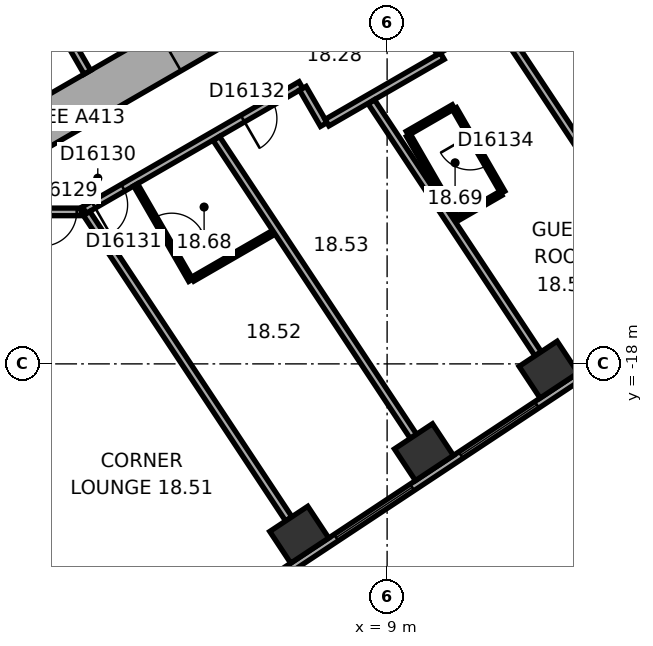
"""IFC4 building model, lengths in metres.
Left out: names, types, materials, properties, quantities, classifications, styles, units other than length and angle.
Written with IfcOpenShell. Run it as: python <this file> out.ifc"""

import sys

from ifc_helpers import new_model, si_unit, direction, frame, frame_2d, origin, origin_2d, place, context, subcontext, project, spatial, rectangle, extrude, element, fill, save


model = new_model("IFC4")
c1 = context("Model", 3, precision=1e-05, world=origin(), true_north=direction((0.0, 1.0)))
c2 = subcontext(c1, "Body", "Model", "MODEL_VIEW")
j1 = project(units=[si_unit("LENGTHUNIT", "METRE"), si_unit("PLANEANGLEUNIT", "RADIAN")], contexts=[c1])
p1 = place(None, origin())
s1 = spatial("IfcSite", under=j1, at=p1, CompositionType="ELEMENT")
p2 = place(p1, origin())
s2 = spatial("IfcBuilding", under=s1, at=p2, CompositionType="ELEMENT")
p3 = place(p2, frame((0.0, 0.0, 83.6)))
s3 = spatial("IfcBuildingStorey", under=s2, at=p3, CompositionType="ELEMENT", Elevation=83.6)
for number, where, z_axis, x_axis in (
    (1, (6.688, -22.496, 0.0), (0.0, 0.0, 1.0), (0.834, 0.552, 0.0)),
    (2, (9.969, -20.324, 0.0), (0.0, 0.0, 1.0), (0.834, 0.552, 0.0)),
    (3, (13.25, -18.152, 0.0), (0.0, 0.0, 1.0), (0.834, 0.552, 0.0)),
):
    element("IfcColumn", number, at=place(p3, frame(where, z_axis=z_axis, x_axis=x_axis)), inside=s3, PredefinedType="COLUMN", context=c2, shape_type="SweptSolid", body=[
        extrude(rectangle(XDim=1.2, YDim=1.0, at=origin_2d()), origin(), (0.0, 0.0, 1.0), 3.3),
    ])
p4 = place(p3, frame((-10.4, -5.658, 0.0), z_axis=(0.0, 0.0, 1.0), x_axis=(0.866021384402, -0.500006961711, 0.0)))
e4 = element("IfcWall", 4, at=p4, inside=s3, PredefinedType="SHEAR", context=c2, shape_type="SweptSolid", body=[
    extrude(rectangle(XDim=12.355, YDim=1.2, at=frame_2d((6.178, 0.0))), origin(), (0.0, 0.0, 1.0), 3.3),
])
p5 = place(p4, frame((6.378, 0.0, 0.0)))
e5 = element("IfcOpeningElement", 5, at=p5, cuts=e4, PredefinedType="OPENING", context=c2, shape_type="SweptSolid", body=[
    extrude(rectangle(XDim=1.5, YDim=2.1, at=frame_2d((0.75, 1.05))), frame((0.0, 0.61, 0.0), z_axis=(0.0, -1.0, 0.0), x_axis=(1.0, 0.0, 0.0)), (0.0, 0.0, 1.0), 1.22),
])
p6 = place(p4, frame((3.228, 0.0, 0.0)))
e6 = element("IfcOpeningElement", 6, at=p6, cuts=e4, PredefinedType="OPENING", context=c2, shape_type="SweptSolid", body=[
    extrude(rectangle(XDim=0.9, YDim=2.1, at=frame_2d((0.45, 1.05))), frame((0.0, 0.61, 0.0), z_axis=(0.0, -1.0, 0.0), x_axis=(1.0, 0.0, 0.0)), (0.0, 0.0, 1.0), 1.22),
])
p7 = place(p3, frame((-0.3, -11.836, 0.0), z_axis=(0.0, 0.0, 1.0), x_axis=(0.866021384402, 0.500006961711, 0.0)))
e7 = element("IfcWall", 7, at=p7, inside=s3, PredefinedType="SHEAR", context=c2, shape_type="SweptSolid", body=[
    extrude(rectangle(XDim=12.355, YDim=1.2, at=frame_2d((6.178, 0.0))), origin(), (0.0, 0.0, 1.0), 3.3),
])
p8 = place(p7, frame((4.128, 0.0, 0.0)))
e8 = element("IfcOpeningElement", 8, at=p8, cuts=e7, PredefinedType="OPENING", context=c2, shape_type="SweptSolid", body=[
    extrude(rectangle(XDim=0.9, YDim=2.1, at=frame_2d((0.45, 1.05))), frame((0.0, 0.61, 0.0), z_axis=(0.0, -1.0, 0.0), x_axis=(1.0, 0.0, 0.0)), (0.0, 0.0, 1.0), 1.22),
])
p9 = place(p7, frame((7.928, 0.0, 0.0)))
e9 = element("IfcOpeningElement", 9, at=p9, cuts=e7, PredefinedType="OPENING", context=c2, shape_type="SweptSolid", body=[
    extrude(rectangle(XDim=1.1, YDim=2.1, at=frame_2d((0.55, 1.05))), frame((0.0, 0.61, 0.0), z_axis=(0.0, -1.0, 0.0), x_axis=(1.0, 0.0, 0.0)), (0.0, 0.0, 1.0), 1.22),
])
p10 = place(p3, frame((3.083, -25.601, 0.0), z_axis=(0.0, 0.0, 1.0), x_axis=(0.833884295743, 0.551939291329, 0.0)))
e10 = element("IfcWall", 10, at=p10, inside=s3, PredefinedType="STANDARD", context=c2, shape_type="SweptSolid", body=[
    extrude(rectangle(XDim=21.246, YDim=0.2, at=frame_2d((10.623, 0.0))), origin(), (0.0, 0.0, 1.0), 3.3),
])
p11 = place(p10, frame((1.553, 0.0, 0.8)))
e11 = element("IfcOpeningElement", 11, at=p11, cuts=e10, PredefinedType="OPENING", context=c2, shape_type="SweptSolid", body=[
    extrude(rectangle(XDim=2.4, YDim=1.7, at=frame_2d((1.2, 0.85))), frame((0.0, 0.11, 0.0), z_axis=(0.0, -1.0, 0.0), x_axis=(1.0, 0.0, 0.0)), (0.0, 0.0, 1.0), 0.22),
])
p12 = place(p10, frame((5.488, 0.0, 0.8)))
e12 = element("IfcOpeningElement", 12, at=p12, cuts=e10, PredefinedType="OPENING", context=c2, shape_type="SweptSolid", body=[
    extrude(rectangle(XDim=2.4, YDim=1.7, at=frame_2d((1.2, 0.85))), frame((0.0, 0.11, 0.0), z_axis=(0.0, -1.0, 0.0), x_axis=(1.0, 0.0, 0.0)), (0.0, 0.0, 1.0), 0.22),
])
p13 = place(p10, frame((9.422, 0.0, 0.8)))
e13 = element("IfcOpeningElement", 13, at=p13, cuts=e10, PredefinedType="OPENING", context=c2, shape_type="SweptSolid", body=[
    extrude(rectangle(XDim=2.4, YDim=1.7, at=frame_2d((1.2, 0.85))), frame((0.0, 0.11, 0.0), z_axis=(0.0, -1.0, 0.0), x_axis=(1.0, 0.0, 0.0)), (0.0, 0.0, 1.0), 0.22),
])
p14 = place(p10, frame((13.357, 0.0, 0.8)))
e14 = element("IfcOpeningElement", 14, at=p14, cuts=e10, PredefinedType="OPENING", context=c2, shape_type="SweptSolid", body=[
    extrude(rectangle(XDim=2.4, YDim=1.7, at=frame_2d((1.2, 0.85))), frame((0.0, 0.11, 0.0), z_axis=(0.0, -1.0, 0.0), x_axis=(1.0, 0.0, 0.0)), (0.0, 0.0, 1.0), 0.22),
])
p15 = place(p10, frame((17.291, 0.0, 0.8)))
e15 = element("IfcOpeningElement", 15, at=p15, cuts=e10, PredefinedType="OPENING", context=c2, shape_type="SweptSolid", body=[
    extrude(rectangle(XDim=2.4, YDim=1.7, at=frame_2d((1.2, 0.85))), frame((0.0, 0.11, 0.0), z_axis=(0.0, -1.0, 0.0), x_axis=(1.0, 0.0, 0.0)), (0.0, 0.0, 1.0), 0.22),
])
p16 = place(p3, frame((0.013, -8.422, 0.0), z_axis=(0.0, 0.0, 1.0), x_axis=(0.500077893725, -0.86598042715, 0.0)))
e16 = element("IfcWall", 16, at=p16, inside=s3, PredefinedType="PARTITIONING", context=c2, shape_type="SweptSolid", body=[
    extrude(rectangle(XDim=2.2, YDim=0.2, at=frame_2d((1.1, 0.0))), origin(), (0.0, 0.0, 1.0), 3.05),
])
p17 = place(p3, frame((-0.186, -14.001, 0.0), z_axis=(0.0, 0.0, 1.0), x_axis=(1.0, 0.0, 0.0)))
e17 = element("IfcWall", 17, at=p17, inside=s3, PredefinedType="PARTITIONING", context=c2, shape_type="SweptSolid", body=[
    extrude(rectangle(XDim=1.136, YDim=0.2, at=frame_2d((0.568, 0.0))), origin(), (0.0, 0.0, 1.0), 3.05),
])
p18 = place(p17, frame((0.118, 0.0, 0.0)))
e18 = element("IfcOpeningElement", 18, at=p18, cuts=e17, PredefinedType="OPENING", context=c2, shape_type="SweptSolid", body=[
    extrude(rectangle(XDim=0.9, YDim=2.1, at=frame_2d((0.45, 1.05))), frame((0.0, 0.11, 0.0), z_axis=(0.0, -1.0, 0.0), x_axis=(1.0, 0.0, 0.0)), (0.0, 0.0, 1.0), 0.22),
])
p19 = place(p3, frame((1.033, -13.953, 0.0), z_axis=(0.0, 0.0, 1.0), x_axis=(0.866017531406, 0.500013635111, 0.0)))
e19 = element("IfcWall", 19, at=p19, inside=s3, PredefinedType="PARTITIONING", context=c2, shape_type="SweptSolid", body=[
    extrude(rectangle(XDim=6.58, YDim=0.2, at=frame_2d((3.29, 0.0))), origin(), (0.0, 0.0, 1.0), 3.05),
])
p20 = place(p19, frame((0.275, 0.0, 0.0)))
e20 = element("IfcOpeningElement", 20, at=p20, cuts=e19, PredefinedType="OPENING", context=c2, shape_type="SweptSolid", body=[
    extrude(rectangle(XDim=0.9, YDim=2.1, at=frame_2d((0.45, 1.05))), frame((0.0, 0.11, 0.0), z_axis=(0.0, -1.0, 0.0), x_axis=(1.0, 0.0, 0.0)), (0.0, 0.0, 1.0), 0.22),
])
p21 = place(p19, frame((4.811, 0.0, 0.0)))
e21 = element("IfcOpeningElement", 21, at=p21, cuts=e19, PredefinedType="OPENING", context=c2, shape_type="SweptSolid", body=[
    extrude(rectangle(XDim=0.9, YDim=2.1, at=frame_2d((0.45, 1.05))), frame((0.0, 0.11, 0.0), z_axis=(0.0, -1.0, 0.0), x_axis=(1.0, 0.0, 0.0)), (0.0, 0.0, 1.0), 0.22),
])
p22 = place(p3, frame((3.833, -15.801, 0.0), z_axis=(0.0, 0.0, 1.0), x_axis=(-0.500023687443, 0.866011727401, 0.0)))
e22 = element("IfcWall", 22, at=p22, inside=s3, PredefinedType="PARTITIONING", context=c2, shape_type="SweptSolid", body=[
    extrude(rectangle(XDim=2.9, YDim=0.12, at=frame_2d((1.45, 0.0))), origin(), (0.0, 0.0, 1.0), 3.05),
])
p23 = place(p22, frame((1.0, 0.0, 0.0)))
e23 = element("IfcOpeningElement", 23, at=p23, cuts=e22, PredefinedType="OPENING", context=c2, shape_type="SweptSolid", body=[
    extrude(rectangle(XDim=0.9, YDim=2.1, at=frame_2d((0.45, 1.05))), frame((0.0, 0.07, 0.0), z_axis=(0.0, -1.0, 0.0), x_axis=(1.0, 0.0, 0.0)), (0.0, 0.0, 1.0), 0.14),
])
p24 = place(p3, frame((6.02, -14.538, 0.0), z_axis=(0.0, 0.0, 1.0), x_axis=(-0.866022320763, -0.500005339912, 0.0)))
e24 = element("IfcWall", 24, at=p24, inside=s3, PredefinedType="PARTITIONING", context=c2, shape_type="SweptSolid", body=[
    extrude(rectangle(XDim=2.465, YDim=0.12, at=frame_2d((1.233, 0.0))), origin(), (0.0, 0.0, 1.0), 3.05),
])
p25 = place(p3, frame((6.412, -22.079, 0.0), z_axis=(0.0, 0.0, 1.0), x_axis=(-0.551919507115, 0.83389739037, 0.0)))
e25 = element("IfcWall", 25, at=p25, inside=s3, PredefinedType="PARTITIONING", context=c2, shape_type="SweptSolid", body=[
    extrude(rectangle(XDim=9.635, YDim=0.2, at=frame_2d((4.817, 0.0))), origin(), (0.0, 0.0, 1.0), 3.05),
])
p26 = place(p3, frame((6.782, -10.749, 0.0), z_axis=(0.0, 0.0, 1.0), x_axis=(0.500074377092, -0.865982457891, 0.0)))
e26 = element("IfcWall", 26, at=p26, inside=s3, PredefinedType="PARTITIONING", context=c2, shape_type="SweptSolid", body=[
    extrude(rectangle(XDim=1.101, YDim=0.2, at=frame_2d((0.55, 0.0))), origin(), (0.0, 0.0, 1.0), 3.05),
])
p27 = place(p3, frame((7.419, -11.653, 0.0), z_axis=(0.0, 0.0, 1.0), x_axis=(0.866038154057, 0.49997791523, 0.0)))
e27 = element("IfcWall", 27, at=p27, inside=s3, PredefinedType="PARTITIONING", context=c2, shape_type="SweptSolid", body=[
    extrude(rectangle(XDim=3.502, YDim=0.2, at=frame_2d((1.751, 0.0))), origin(), (0.0, 0.0, 1.0), 3.05),
])
p28 = place(p3, frame((9.532, -11.934, 0.0), z_axis=(0.0, 0.0, 1.0), x_axis=(0.866034573852, 0.49998411664, 0.0)))
e28 = element("IfcWall", 28, at=p28, inside=s3, PredefinedType="PARTITIONING", context=c2, shape_type="SweptSolid", body=[
    extrude(rectangle(XDim=1.4, YDim=0.12, at=frame_2d((0.7, 0.0))), origin(), (0.0, 0.0, 1.0), 3.05),
])
p29 = place(p3, frame((9.693, -19.907, 0.0), z_axis=(0.0, 0.0, 1.0), x_axis=(-0.551938394837, 0.833884889121, 0.0)))
e29 = element("IfcWall", 29, at=p29, inside=s3, PredefinedType="PARTITIONING", context=c2, shape_type="SweptSolid", body=[
    extrude(rectangle(XDim=9.394, YDim=0.2, at=frame_2d((4.697, 0.0))), origin(), (0.0, 0.0, 1.0), 2.6),
])
p30 = place(p3, frame((10.402, -9.815, 0.0), z_axis=(0.0, 0.0, 1.0), x_axis=(-0.499968756647, 0.866043441391, 0.0)))
e30 = element("IfcWall", 30, at=p30, inside=s3, PredefinedType="PARTITIONING", context=c2, shape_type="SweptSolid", body=[
    extrude(rectangle(XDim=1.001, YDim=0.2, at=frame_2d((0.5, 0.0))), origin(), (0.0, 0.0, 1.0), 3.05),
])
p31 = place(p3, frame((10.775, -11.286, 0.0), z_axis=(0.0, 0.0, 1.0), x_axis=(0.500046963369, -0.865998287773, 0.0)))
e31 = element("IfcWall", 31, at=p31, inside=s3, PredefinedType="PARTITIONING", context=c2, shape_type="SweptSolid", body=[
    extrude(rectangle(XDim=2.54, YDim=0.12, at=frame_2d((1.27, 0.0))), origin(), (0.0, 0.0, 1.0), 3.05),
])
p32 = place(p31, frame((0.82, 0.0, 0.0)))
e32 = element("IfcOpeningElement", 32, at=p32, cuts=e31, PredefinedType="OPENING", context=c2, shape_type="SweptSolid", body=[
    extrude(rectangle(XDim=0.9, YDim=2.1, at=frame_2d((0.45, 1.05))), frame((0.0, 0.07, 0.0), z_axis=(0.0, -1.0, 0.0), x_axis=(1.0, 0.0, 0.0)), (0.0, 0.0, 1.0), 0.14),
])
p33 = place(p3, frame((10.833, -14.185, 0.0), z_axis=(0.0, 0.0, 1.0), x_axis=(-0.500005339912, 0.866022320763, 0.0)))
e33 = element("IfcWall", 33, at=p33, inside=s3, PredefinedType="PARTITIONING", context=c2, shape_type="SweptSolid", body=[
    extrude(rectangle(XDim=2.54, YDim=0.12, at=frame_2d((1.27, 0.0))), origin(), (0.0, 0.0, 1.0), 3.05),
])
p34 = place(p3, frame((11.993, -13.515, 0.0), z_axis=(0.0, 0.0, 1.0), x_axis=(-0.865956862152, -0.500118698802, 0.0)))
e34 = element("IfcWall", 34, at=p34, inside=s3, PredefinedType="PARTITIONING", context=c2, shape_type="SweptSolid", body=[
    extrude(rectangle(XDim=1.28, YDim=0.12, at=frame_2d((0.64, 0.0))), origin(), (0.0, 0.0, 1.0), 3.05),
])
p35 = place(p3, frame((12.974, -17.735, 0.0), z_axis=(0.0, 0.0, 1.0), x_axis=(-0.55192625685, 0.833892922982, 0.0)))
e35 = element("IfcWall", 35, at=p35, inside=s3, PredefinedType="PARTITIONING", context=c2, shape_type="SweptSolid", body=[
    extrude(rectangle(XDim=7.95, YDim=0.2, at=frame_2d((3.975, 0.0))), origin(), (0.0, 0.0, 1.0), 3.05),
])
p36 = place(p3, frame((16.255, -15.564, 0.0), z_axis=(0.0, 0.0, 1.0), x_axis=(-0.55192208744, 0.833895682562, 0.0)))
e36 = element("IfcWall", 36, at=p36, inside=s3, PredefinedType="PARTITIONING", context=c2, shape_type="SweptSolid", body=[
    extrude(rectangle(XDim=8.913, YDim=0.2, at=frame_2d((4.457, 0.0))), origin(), (0.0, 0.0, 1.0), 2.6),
])
p37 = place(p12, origin())
e37 = element("IfcWindow", 37, at=p37, inside=s3, PartitioningType="SINGLE_PANEL", PredefinedType="WINDOW", context=c2, shape_type="SweptSolid", body=[
    extrude(rectangle(XDim=2.4, YDim=1.7, at=frame_2d((1.2, 0.85))), frame((0.0, 0.03, 0.0), z_axis=(0.0, -1.0, 0.0), x_axis=(1.0, 0.0, 0.0)), (0.0, 0.0, 1.0), 0.06),
])
fill(e12, e37)
p38 = place(p13, origin())
e38 = element("IfcWindow", 38, at=p38, inside=s3, PartitioningType="SINGLE_PANEL", PredefinedType="WINDOW", context=c2, shape_type="SweptSolid", body=[
    extrude(rectangle(XDim=2.4, YDim=1.7, at=frame_2d((1.2, 0.85))), frame((0.0, 0.03, 0.0), z_axis=(0.0, -1.0, 0.0), x_axis=(1.0, 0.0, 0.0)), (0.0, 0.0, 1.0), 0.06),
])
fill(e13, e38)
p39 = place(p18, origin())
e39 = element("IfcDoor", 39, at=p39, inside=s3, OperationType="SINGLE_SWING_LEFT", PredefinedType="DOOR", context=c2, shape_type="SweptSolid", body=[
    extrude(rectangle(XDim=0.9, YDim=2.1, at=frame_2d((0.45, 1.05))), frame((0.0, 0.025, 0.0), z_axis=(0.0, -1.0, 0.0), x_axis=(1.0, 0.0, 0.0)), (0.0, 0.0, 1.0), 0.05),
])
fill(e18, e39)
p40 = place(p20, origin())
e40 = element("IfcDoor", 40, at=p40, inside=s3, OperationType="SINGLE_SWING_LEFT", PredefinedType="DOOR", context=c2, shape_type="SweptSolid", body=[
    extrude(rectangle(XDim=0.9, YDim=2.1, at=frame_2d((0.45, 1.05))), frame((0.0, 0.025, 0.0), z_axis=(0.0, -1.0, 0.0), x_axis=(1.0, 0.0, 0.0)), (0.0, 0.0, 1.0), 0.05),
])
fill(e20, e40)
p41 = place(p23, origin())
e41 = element("IfcDoor", 41, at=p41, inside=s3, OperationType="SINGLE_SWING_LEFT", PredefinedType="DOOR", context=c2, shape_type="SweptSolid", body=[
    extrude(rectangle(XDim=0.9, YDim=2.1, at=frame_2d((0.45, 1.05))), frame((0.0, 0.025, 0.0), z_axis=(0.0, -1.0, 0.0), x_axis=(1.0, 0.0, 0.0)), (0.0, 0.0, 1.0), 0.05),
])
fill(e23, e41)
p42 = place(p21, origin())
e42 = element("IfcDoor", 42, at=p42, inside=s3, OperationType="SINGLE_SWING_LEFT", PredefinedType="DOOR", context=c2, shape_type="SweptSolid", body=[
    extrude(rectangle(XDim=0.9, YDim=2.1, at=frame_2d((0.45, 1.05))), frame((0.0, 0.025, 0.0), z_axis=(0.0, -1.0, 0.0), x_axis=(1.0, 0.0, 0.0)), (0.0, 0.0, 1.0), 0.05),
])
fill(e21, e42)
p43 = place(p32, origin())
e43 = element("IfcDoor", 43, at=p43, inside=s3, OperationType="SINGLE_SWING_LEFT", PredefinedType="DOOR", context=c2, shape_type="SweptSolid", body=[
    extrude(rectangle(XDim=0.9, YDim=2.1, at=frame_2d((0.45, 1.05))), frame((0.0, 0.025, 0.0), z_axis=(0.0, -1.0, 0.0), x_axis=(1.0, 0.0, 0.0)), (0.0, 0.0, 1.0), 0.05),
])
fill(e32, e43)
save(model, sys.argv[1])
